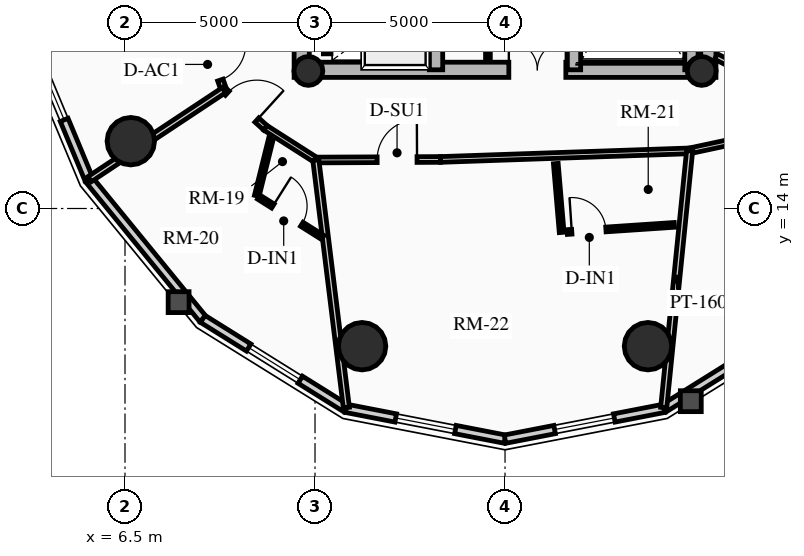
"""IFC4 building model, lengths in metres.
Left out: names, types, materials, properties, quantities, classifications, styles, units other than length and angle.
Written with IfcOpenShell. Run it as: python <this file> out.ifc"""

import sys

from ifc_helpers import new_model, si_unit, direction, frame, frame_2d, origin, origin_2d, place, context, subcontext, project, spatial, rectangle, circle, hollow_circle, extrude, source, transform, mapped, element, fill, save


model = new_model("IFC4")
c1 = context("Model", 3, precision=1e-05, world=origin(), true_north=direction((0.0, 1.0)))
c2 = subcontext(c1, "Body", "Model", "MODEL_VIEW")
j1 = project(units=[si_unit("LENGTHUNIT", "METRE"), si_unit("PLANEANGLEUNIT", "RADIAN")], contexts=[c1])
p1 = place(None, origin())
s1 = spatial("IfcSite", under=j1, at=p1, CompositionType="ELEMENT")
p2 = place(p1, origin())
s2 = spatial("IfcBuilding", under=s1, at=p2, CompositionType="ELEMENT")
p3 = place(p2, frame((0.0, 0.0, 183.61)))
s3 = spatial("IfcBuildingStorey", under=s2, at=p3, CompositionType="ELEMENT", Elevation=183.61)
for number, where, z_axis, x_axis in (
    (1, (11.15, 17.45, 0.0), (0.0, 0.0, 1.0), (0.0, 1.0, 0.0)),
    (2, (21.85, 17.45, 0.0), (0.0, 0.0, 1.0), (0.0, 1.0, 0.0)),
):
    element("IfcWall", number, at=place(p3, frame(where, z_axis=z_axis, x_axis=x_axis)), inside=s3, PredefinedType="SHEAR", context=c2, shape_type="SweptSolid", body=[
        extrude(rectangle(XDim=14.1, YDim=0.4, at=frame_2d((7.05, 0.0))), origin(), (0.0, 0.0, 1.0), 2.91),
    ])
p4 = place(p3, frame((11.15, 17.65, 0.0), z_axis=(0.0, 0.0, 1.0), x_axis=(1.0, 0.0, 0.0)))
e3 = element("IfcWall", 3, at=p4, inside=s3, PredefinedType="SHEAR", context=c2, shape_type="SweptSolid", body=[
    extrude(rectangle(XDim=10.7, YDim=0.4, at=frame_2d((5.35, 0.0))), origin(), (0.0, 0.0, 1.0), 2.91),
])
m1 = source(origin(), c2, "Body", "SweptSolid", [
    extrude(rectangle(XDim=1.5, YDim=2.02, at=frame_2d((0.75, 1.01))), frame((0.0, 0.21, 0.0), z_axis=(0.0, -1.0, 0.0), x_axis=(1.0, 0.0, 0.0)), (0.0, 0.0, 1.0), 0.42),
])
p5 = place(p4, frame((5.45, 0.0, 0.0)))
e4 = element("IfcOpeningElement", 4, at=p5, cuts=e3, PredefinedType="OPENING", context=c2, shape_type="MappedRepresentation", body=[
    mapped(m1, transform((0.0, 0.0, 0.0), x_axis=(1.0, 0.0, 0.0), y_axis=(0.0, 1.0, 0.0), z_axis=(0.0, 0.0, 1.0), scale=1.0)),
])
p6 = place(p3, frame((14.685, 17.65, 0.0), z_axis=(0.0, 0.0, 1.0), x_axis=(0.0, 1.0, 0.0)))
e5 = element("IfcWall", 5, at=p6, inside=s3, PredefinedType="SHEAR", context=c2, shape_type="SweptSolid", body=[
    extrude(rectangle(XDim=13.7, YDim=0.35, at=frame_2d((6.85, 0.0))), origin(), (0.0, 0.0, 1.0), 2.91),
])
m2 = source(origin(), c2, "Body", "SweptSolid", [
    extrude(rectangle(XDim=1.1, YDim=2.015, at=frame_2d((0.55, 1.007))), frame((0.0, 0.185, 0.0), z_axis=(0.0, -1.0, 0.0), x_axis=(1.0, 0.0, 0.0)), (0.0, 0.0, 1.0), 0.37),
])
p7 = place(p6, frame((4.85, 0.0, 0.0)))
e6 = element("IfcOpeningElement", 6, at=p7, cuts=e5, PredefinedType="OPENING", context=c2, shape_type="MappedRepresentation", body=[
    mapped(m2, transform((0.0, 0.0, 0.0), x_axis=(1.0, 0.0, 0.0), y_axis=(0.0, 1.0, 0.0), z_axis=(0.0, 0.0, 1.0), scale=1.0)),
])
p8 = place(p6, frame((0.625, 0.0, 0.0)))
e7 = element("IfcOpeningElement", 7, at=p8, cuts=e5, PredefinedType="OPENING", context=c2, shape_type="MappedRepresentation", body=[
    mapped(m2, transform((0.0, 0.0, 0.0), x_axis=(1.0, 0.0, 0.0), y_axis=(0.0, 1.0, 0.0), z_axis=(0.0, 0.0, 1.0), scale=1.0)),
])
p9 = place(p6, frame((2.625, 0.0, 0.0)))
e8 = element("IfcOpeningElement", 8, at=p9, cuts=e5, PredefinedType="OPENING", context=c2, shape_type="MappedRepresentation", body=[
    mapped(m2, transform((0.0, 0.0, 0.0), x_axis=(1.0, 0.0, 0.0), y_axis=(0.0, 1.0, 0.0), z_axis=(0.0, 0.0, 1.0), scale=1.0)),
])
m3 = source(origin(), c2, "Body", "SweptSolid", [
    extrude(rectangle(XDim=1.15, YDim=2.02, at=frame_2d((0.575, 1.01))), frame((0.0, 0.185, 0.0), z_axis=(0.0, -1.0, 0.0), x_axis=(1.0, 0.0, 0.0)), (0.0, 0.0, 1.0), 0.37),
])
p10 = place(p6, frame((7.27, 0.0, 0.0)))
e9 = element("IfcOpeningElement", 9, at=p10, cuts=e5, PredefinedType="OPENING", context=c2, shape_type="MappedRepresentation", body=[
    mapped(m3, transform((0.0, 0.0, 0.0), x_axis=(1.0, 0.0, 0.0), y_axis=(0.0, 1.0, 0.0), z_axis=(0.0, 0.0, 1.0), scale=1.0)),
])
p11 = place(p3, frame((18.315, 17.65, 0.0), z_axis=(0.0, 0.0, 1.0), x_axis=(0.0, 1.0, 0.0)))
e10 = element("IfcWall", 10, at=p11, inside=s3, PredefinedType="SHEAR", context=c2, shape_type="SweptSolid", body=[
    extrude(rectangle(XDim=9.6, YDim=0.35, at=frame_2d((4.8, 0.0))), origin(), (0.0, 0.0, 1.0), 2.91),
])
p12 = place(p11, frame((5.28, 0.0, 0.0)))
e11 = element("IfcOpeningElement", 11, at=p12, cuts=e10, PredefinedType="OPENING", context=c2, shape_type="MappedRepresentation", body=[
    mapped(m3, transform((0.0, 0.0, 0.0), x_axis=(1.0, 0.0, 0.0), y_axis=(0.0, 1.0, 0.0), z_axis=(0.0, 0.0, 1.0), scale=1.0)),
])
p13 = place(p3, frame((21.405, 17.65, 0.0), z_axis=(0.0, 0.0, 1.0), x_axis=(0.0, 1.0, 0.0)))
e12 = element("IfcWall", 12, at=p13, inside=s3, PredefinedType="SHEAR", context=c2, shape_type="SweptSolid", body=[
    extrude(rectangle(XDim=6.695, YDim=0.35, at=frame_2d((3.348, 0.0))), origin(), (0.0, 0.0, 1.0), 2.91),
])
for number, where, z_axis, x_axis in (
    (13, (11.325, 17.62, 0.0), (0.0, 0.0, 1.0), (1.0, 0.0, 0.0)),
    (14, (21.675, 17.62, 0.0), (0.0, 0.0, 1.0), (1.0, 0.0, 0.0)),
):
    element("IfcColumn", number, at=place(p3, frame(where, z_axis=z_axis, x_axis=x_axis)), inside=s3, PredefinedType="COLUMN", context=c2, shape_type="SweptSolid", body=[
        extrude(hollow_circle(Radius=0.38, WallThickness=0.032, at=origin_2d()), origin(), (0.0, 0.0, 1.0), 2.91),
    ])
for number, where, z_axis, x_axis in (
    (15, (6.653, 15.771, 0.0), (0.0, 0.0, 1.0), (1.0, 0.0, 0.0)),
    (16, (12.739, 10.377, 0.0), (0.0, 0.0, 1.0), (1.0, 0.0, 0.0)),
    (17, (20.261, 10.377, 0.0), (0.0, 0.0, 1.0), (1.0, 0.0, 0.0)),
):
    element("IfcColumn", number, at=place(p3, frame(where, z_axis=z_axis, x_axis=x_axis)), inside=s3, PredefinedType="USERDEFINED", context=c2, shape_type="SweptSolid", body=[
        extrude(circle(Radius=0.625, at=origin_2d()), origin(), (0.0, 0.0, 1.0), 2.91),
    ])
p14 = place(p3, frame((5.553, 14.76, 0.0), z_axis=(0.0, 0.0, 1.0), x_axis=(-0.384144094086, 0.923273152961, 0.0)))
e18 = element("IfcWall", 18, at=p14, inside=s3, PredefinedType="SOLIDWALL", context=c2, shape_type="SweptSolid", body=[
    extrude(rectangle(XDim=5.003, YDim=0.22, at=frame_2d((2.501, 0.0))), origin(), (0.0, 0.0, 1.0), 2.245),
])
m4 = source(origin(), c2, "Body", "SweptSolid", [
    extrude(rectangle(XDim=1.6, YDim=1.3, at=frame_2d((0.8, 0.65))), frame((0.0, 0.12, 0.0), z_axis=(0.0, -1.0, 0.0), x_axis=(1.0, 0.0, 0.0)), (0.0, 0.0, 1.0), 0.24),
])
p15 = place(p14, frame((1.702, 0.0, 0.65)))
e19 = element("IfcOpeningElement", 19, at=p15, cuts=e18, PredefinedType="OPENING", context=c2, shape_type="MappedRepresentation", body=[
    mapped(m4, transform((0.0, 0.0, 0.0), x_axis=(1.0, 0.0, 0.0), y_axis=(0.0, 1.0, 0.0), z_axis=(0.0, 0.0, 1.0), scale=1.0)),
])
p16 = place(p3, frame((8.547, 11.094, 0.0), z_axis=(0.0, 0.0, 1.0), x_axis=(-0.632470615287, 0.774584353572, 0.0)))
e20 = element("IfcWall", 20, at=p16, inside=s3, PredefinedType="SOLIDWALL", context=c2, shape_type="SweptSolid", body=[
    extrude(rectangle(XDim=4.733, YDim=0.22, at=frame_2d((2.366, 0.0))), origin(), (0.0, 0.0, 1.0), 2.245),
])
p17 = place(p3, frame((12.319, 8.741, 0.0), z_axis=(0.0, 0.0, 1.0), x_axis=(-0.848399108042, 0.529357113368, 0.0)))
e21 = element("IfcWall", 21, at=p17, inside=s3, PredefinedType="SOLIDWALL", context=c2, shape_type="SweptSolid", body=[
    extrude(rectangle(XDim=4.446, YDim=0.22, at=frame_2d((2.223, 0.0))), origin(), (0.0, 0.0, 1.0), 2.245),
])
p18 = place(p17, frame((1.423, 0.0, 0.65)))
e22 = element("IfcOpeningElement", 22, at=p18, cuts=e21, PredefinedType="OPENING", context=c2, shape_type="MappedRepresentation", body=[
    mapped(m4, transform((0.0, 0.0, 0.0), x_axis=(1.0, 0.0, 0.0), y_axis=(0.0, 1.0, 0.0), z_axis=(0.0, 0.0, 1.0), scale=1.0)),
])
p19 = place(p3, frame((16.5, 7.93, 0.0), z_axis=(0.0, 0.0, 1.0), x_axis=(-0.981703883443, 0.190413983815, 0.0)))
e23 = element("IfcWall", 23, at=p19, inside=s3, PredefinedType="SOLIDWALL", context=c2, shape_type="SweptSolid", body=[
    extrude(rectangle(XDim=4.259, YDim=0.22, at=frame_2d((2.13, 0.0))), origin(), (0.0, 0.0, 1.0), 2.245),
])
p20 = place(p19, frame((1.33, 0.0, 0.65)))
e24 = element("IfcOpeningElement", 24, at=p20, cuts=e23, PredefinedType="OPENING", context=c2, shape_type="MappedRepresentation", body=[
    mapped(m4, transform((0.0, 0.0, 0.0), x_axis=(1.0, 0.0, 0.0), y_axis=(0.0, 1.0, 0.0), z_axis=(0.0, 0.0, 1.0), scale=1.0)),
])
p21 = place(p3, frame((20.681, 8.741, 0.0), z_axis=(0.0, 0.0, 1.0), x_axis=(-0.981703883443, -0.190413983815, 0.0)))
e25 = element("IfcWall", 25, at=p21, inside=s3, PredefinedType="SOLIDWALL", context=c2, shape_type="SweptSolid", body=[
    extrude(rectangle(XDim=4.259, YDim=0.22, at=frame_2d((2.13, 0.0))), origin(), (0.0, 0.0, 1.0), 2.245),
])
p22 = place(p21, frame((1.33, 0.0, 0.65)))
e26 = element("IfcOpeningElement", 26, at=p22, cuts=e25, PredefinedType="OPENING", context=c2, shape_type="MappedRepresentation", body=[
    mapped(m4, transform((0.0, 0.0, 0.0), x_axis=(1.0, 0.0, 0.0), y_axis=(0.0, 1.0, 0.0), z_axis=(0.0, 0.0, 1.0), scale=1.0)),
])
p23 = place(p3, frame((24.453, 11.094, 0.0), z_axis=(0.0, 0.0, 1.0), x_axis=(-0.848399108042, -0.529357113368, 0.0)))
e27 = element("IfcWall", 27, at=p23, inside=s3, PredefinedType="SOLIDWALL", context=c2, shape_type="SweptSolid", body=[
    extrude(rectangle(XDim=4.446, YDim=0.22, at=frame_2d((2.223, 0.0))), origin(), (0.0, 0.0, 1.0), 2.245),
])
p24 = place(p3, frame((11.82, 18.07, 0.0), z_axis=(0.0, 0.0, 1.0), x_axis=(0.0, 1.0, 0.0)))
e28 = element("IfcWall", 28, at=p24, inside=s3, PredefinedType="SHEAR", context=c2, shape_type="SweptSolid", body=[
    extrude(rectangle(XDim=1.635, YDim=0.2, at=frame_2d((0.817, 0.0))), origin(), (0.0, 0.0, 1.0), 2.91),
])
p25 = place(p3, frame((16.05, 17.92, 0.0), z_axis=(0.0, 0.0, 1.0), x_axis=(0.0, 1.0, 0.0)))
e29 = element("IfcWall", 29, at=p25, inside=s3, PredefinedType="PARTITIONING", context=c2, shape_type="SweptSolid", body=[
    extrude(rectangle(XDim=3.08, YDim=0.125, at=frame_2d((1.54, 0.0))), origin(), (0.0, 0.0, 1.0), 2.675),
])
m5 = source(origin(), c2, "Body", "SweptSolid", [
    extrude(rectangle(XDim=0.9, YDim=2.005, at=frame_2d((0.45, 1.002))), frame((0.0, 0.073, 0.0), z_axis=(0.0, -1.0, 0.0), x_axis=(1.0, 0.0, 0.0)), (0.0, 0.0, 1.0), 0.145),
])
p26 = place(p25, frame((1.05, 0.0, 0.0)))
e30 = element("IfcOpeningElement", 30, at=p26, cuts=e29, PredefinedType="OPENING", context=c2, shape_type="MappedRepresentation", body=[
    mapped(m5, transform((0.0, 0.0, 0.0), x_axis=(1.0, 0.0, 0.0), y_axis=(0.0, 1.0, 0.0), z_axis=(0.0, 0.0, 1.0), scale=1.0)),
])
p27 = place(p3, frame((8.636, 18.436, 0.0), z_axis=(0.0, 0.0, 1.0), x_axis=(0.333211866524, -0.942851977782, 0.0)))
e31 = element("IfcWall", 31, at=p27, inside=s3, PredefinedType="PARTITIONING", context=c2, shape_type="SweptSolid", body=[
    extrude(rectangle(XDim=1.402, YDim=0.15, at=frame_2d((0.701, 0.0))), origin(), (0.0, 0.0, 1.0), 2.245),
])
m6 = source(origin(), c2, "Body", "SweptSolid", [
    extrude(rectangle(XDim=1.0, YDim=2.015, at=frame_2d((0.5, 1.007))), frame((0.0, 0.085, 0.0), z_axis=(0.0, -1.0, 0.0), x_axis=(1.0, 0.0, 0.0)), (0.0, 0.0, 1.0), 0.17),
])
p28 = place(p27, frame((0.12, 0.0, 0.0)))
e32 = element("IfcOpeningElement", 32, at=p28, cuts=e31, PredefinedType="OPENING", context=c2, shape_type="MappedRepresentation", body=[
    mapped(m6, transform((0.0, 0.0, 0.0), x_axis=(1.0, 0.0, 0.0), y_axis=(0.0, 1.0, 0.0), z_axis=(0.0, 0.0, 1.0), scale=1.0)),
])
p29 = place(p3, frame((9.103, 17.115, 0.0), z_axis=(0.0, 0.0, 1.0), x_axis=(0.740186897911, -0.672401186912, 0.0)))
e33 = element("IfcWall", 33, at=p29, inside=s3, PredefinedType="PARTITIONING", context=c2, shape_type="SweptSolid", body=[
    extrude(rectangle(XDim=1.477, YDim=0.15, at=frame_2d((0.738, 0.0))), origin(), (0.0, 0.0, 1.0), 2.245),
])
m7 = source(origin(), c2, "Body", "SweptSolid", [
    extrude(rectangle(XDim=1.05, YDim=2.015, at=frame_2d((0.525, 1.007))), frame((0.0, 0.085, 0.0), z_axis=(0.0, -1.0, 0.0), x_axis=(1.0, 0.0, 0.0)), (0.0, 0.0, 1.0), 0.17),
])
p30 = place(p29, frame((0.12, 0.0, 0.0)))
e34 = element("IfcOpeningElement", 34, at=p30, cuts=e33, PredefinedType="OPENING", context=c2, shape_type="MappedRepresentation", body=[
    mapped(m7, transform((0.0, 0.0, 0.0), x_axis=(1.0, 0.0, 0.0), y_axis=(0.0, 1.0, 0.0), z_axis=(0.0, 0.0, 1.0), scale=1.0)),
])
p31 = place(p3, frame((10.196, 16.122, 0.0), z_axis=(0.0, 0.0, 1.0), x_axis=(0.843021142441, -0.537880426673, 0.0)))
e35 = element("IfcWall", 35, at=p31, inside=s3, PredefinedType="PARTITIONING", context=c2, shape_type="SweptSolid", body=[
    extrude(rectangle(XDim=1.571, YDim=0.15, at=frame_2d((0.786, 0.0))), origin(), (0.0, 0.0, 1.0), 2.245),
])
p32 = place(p3, frame((11.521, 15.276, 0.0), z_axis=(0.0, 0.0, 1.0), x_axis=(0.999990688463, 0.004315436007, 0.0)))
e36 = element("IfcWall", 36, at=p32, inside=s3, PredefinedType="PARTITIONING", context=c2, shape_type="SweptSolid", body=[
    extrude(rectangle(XDim=3.281, YDim=0.15, at=frame_2d((1.641, 0.0))), origin(), (0.0, 0.0, 1.0), 2.245),
])
p33 = place(p32, frame((1.613, 0.0, 0.0)))
e37 = element("IfcOpeningElement", 37, at=p33, cuts=e36, PredefinedType="OPENING", context=c2, shape_type="MappedRepresentation", body=[
    mapped(m7, transform((0.0, 0.0, 0.0), x_axis=(1.0, 0.0, 0.0), y_axis=(0.0, 1.0, 0.0), z_axis=(0.0, 0.0, 1.0), scale=1.0)),
])
p34 = place(p3, frame((14.802, 15.291, 0.0), z_axis=(0.0, 0.0, 1.0), x_axis=(0.999405778293, 0.034468686011, 0.0)))
e38 = element("IfcWall", 38, at=p34, inside=s3, PredefinedType="PARTITIONING", context=c2, shape_type="SweptSolid", body=[
    extrude(rectangle(XDim=6.559, YDim=0.15, at=frame_2d((3.279, 0.0))), origin(), (0.0, 0.0, 1.0), 2.245),
])
p35 = place(p3, frame((21.357, 15.517, 0.0), z_axis=(0.0, 0.0, 1.0), x_axis=(0.977773676035, 0.209663154733, 0.0)))
e39 = element("IfcWall", 39, at=p35, inside=s3, PredefinedType="PARTITIONING", context=c2, shape_type="SweptSolid", body=[
    extrude(rectangle(XDim=1.865, YDim=0.15, at=frame_2d((0.933, 0.0))), origin(), (0.0, 0.0, 1.0), 2.245),
])
p36 = place(p3, frame((9.103, 17.115, 0.0), z_axis=(0.0, 0.0, 1.0), x_axis=(-0.833535637115, -0.552465692745, 0.0)))
e40 = element("IfcWall", 40, at=p36, inside=s3, PredefinedType="PARTITIONING", context=c2, shape_type="SweptSolid", body=[
    extrude(rectangle(XDim=4.24, YDim=0.16, at=frame_2d((2.12, 0.0))), origin(), (0.0, 0.0, 1.0), 2.245),
])
p37 = place(p3, frame((11.521, 15.276, 0.0), z_axis=(0.0, 0.0, 1.0), x_axis=(0.122446537769, -0.992475110715, 0.0)))
e41 = element("IfcWall", 41, at=p37, inside=s3, PredefinedType="PARTITIONING", context=c2, shape_type="SweptSolid", body=[
    extrude(rectangle(XDim=6.566, YDim=0.16, at=frame_2d((3.283, 0.0))), origin(), (0.0, 0.0, 1.0), 2.245),
])
p38 = place(p3, frame((21.357, 15.517, 0.0), z_axis=(0.0, 0.0, 1.0), x_axis=(-0.100446941693, -0.994942416376, 0.0)))
e42 = element("IfcWall", 42, at=p38, inside=s3, PredefinedType="PARTITIONING", context=c2, shape_type="SweptSolid", body=[
    extrude(rectangle(XDim=6.791, YDim=0.16, at=frame_2d((3.396, 0.0))), origin(), (0.0, 0.0, 1.0), 2.245),
])
p39 = place(p3, frame((22.05, 18.0, 0.0), z_axis=(0.0, 0.0, 1.0), x_axis=(0.890660222535, -0.454669515136, 0.0)))
e43 = element("IfcWall", 43, at=p39, inside=s3, PredefinedType="PARTITIONING", context=c2, shape_type="SweptSolid", body=[
    extrude(rectangle(XDim=2.144, YDim=0.16, at=frame_2d((1.072, 0.0))), origin(), (0.0, 0.0, 1.0), 2.245),
])
m8 = source(origin(), c2, "Body", "SweptSolid", [
    extrude(rectangle(XDim=1.05, YDim=2.015, at=frame_2d((0.525, 1.007))), frame((0.0, 0.09, 0.0), z_axis=(0.0, -1.0, 0.0), x_axis=(1.0, 0.0, 0.0)), (0.0, 0.0, 1.0), 0.18),
])
p40 = place(p39, frame((0.894, 0.0, 0.0)))
e44 = element("IfcOpeningElement", 44, at=p40, cuts=e43, PredefinedType="OPENING", context=c2, shape_type="MappedRepresentation", body=[
    mapped(m8, transform((0.0, 0.0, 0.0), x_axis=(1.0, 0.0, 0.0), y_axis=(0.0, 1.0, 0.0), z_axis=(0.0, 0.0, 1.0), scale=1.0)),
])
p41 = place(p3, frame((10.343, 15.847, 0.0), z_axis=(0.0, 0.0, 1.0), x_axis=(-0.240988864291, -0.970527880737, 0.0)))
e45 = element("IfcWall", 45, at=p41, inside=s3, PredefinedType="PARTITIONING", context=c2, shape_type="SweptSolid", body=[
    extrude(rectangle(XDim=1.56, YDim=0.125, at=frame_2d((0.78, 0.0))), origin(), (0.0, 0.0, 1.0), 2.245),
])
p42 = place(p3, frame((10.02, 14.299, 0.0), z_axis=(0.0, 0.0, 1.0), x_axis=(0.846015763056, -0.533157883427, 0.0)))
e46 = element("IfcWall", 46, at=p42, inside=s3, PredefinedType="PARTITIONING", context=c2, shape_type="SweptSolid", body=[
    extrude(rectangle(XDim=1.991, YDim=0.125, at=frame_2d((0.996, 0.0))), origin(), (0.0, 0.0, 1.0), 2.675),
])
p43 = place(p42, frame((0.439, 0.0, 0.0)))
e47 = element("IfcOpeningElement", 47, at=p43, cuts=e46, PredefinedType="OPENING", context=c2, shape_type="MappedRepresentation", body=[
    mapped(m5, transform((0.0, 0.0, 0.0), x_axis=(1.0, 0.0, 0.0), y_axis=(0.0, 1.0, 0.0), z_axis=(0.0, 0.0, 1.0), scale=1.0)),
])
p44 = place(p3, frame((17.836, 15.182, 0.0), z_axis=(0.0, 0.0, 1.0), x_axis=(0.084856554172, -0.996393178025, 0.0)))
e48 = element("IfcWall", 48, at=p44, inside=s3, PredefinedType="PARTITIONING", context=c2, shape_type="SweptSolid", body=[
    extrude(rectangle(XDim=1.818, YDim=0.125, at=frame_2d((0.909, 0.0))), origin(), (0.0, 0.0, 1.0), 2.675),
])
p45 = place(p3, frame((18.137, 13.38, 0.0), z_axis=(0.0, 0.0, 1.0), x_axis=(0.997767152953, 0.066788535611, 0.0)))
e49 = element("IfcWall", 49, at=p45, inside=s3, PredefinedType="PARTITIONING", context=c2, shape_type="SweptSolid", body=[
    extrude(rectangle(XDim=2.826, YDim=0.125, at=frame_2d((1.413, 0.0))), origin(), (0.0, 0.0, 1.0), 2.245),
])
p46 = place(p45, frame((0.12, 0.0, 0.0)))
e50 = element("IfcOpeningElement", 50, at=p46, cuts=e49, PredefinedType="OPENING", context=c2, shape_type="MappedRepresentation", body=[
    mapped(m5, transform((0.0, 0.0, 0.0), x_axis=(1.0, 0.0, 0.0), y_axis=(0.0, 1.0, 0.0), z_axis=(0.0, 0.0, 1.0), scale=1.0)),
])
m9 = source(origin(), c2, "Body", "SweptSolid", [
    extrude(rectangle(XDim=1.6, YDim=1.3, at=frame_2d((0.8, 0.65))), frame((0.0, 0.03, 0.0), z_axis=(0.0, -1.0, 0.0), x_axis=(1.0, 0.0, 0.0)), (0.0, 0.0, 1.0), 0.06),
])
p47 = place(p15, origin())
e51 = element("IfcWindow", 51, at=p47, inside=s3, PartitioningType="SINGLE_PANEL", PredefinedType="WINDOW", context=c2, shape_type="MappedRepresentation", body=[
    mapped(m9, transform((0.0, 0.0, 0.0), x_axis=(1.0, 0.0, 0.0), y_axis=(0.0, 1.0, 0.0), z_axis=(0.0, 0.0, 1.0), scale=1.0)),
])
fill(e19, e51)
p48 = place(p18, origin())
e52 = element("IfcWindow", 52, at=p48, inside=s3, PartitioningType="SINGLE_PANEL", PredefinedType="WINDOW", context=c2, shape_type="MappedRepresentation", body=[
    mapped(m9, transform((0.0, 0.0, 0.0), x_axis=(1.0, 0.0, 0.0), y_axis=(0.0, 1.0, 0.0), z_axis=(0.0, 0.0, 1.0), scale=1.0)),
])
fill(e22, e52)
p49 = place(p20, origin())
e53 = element("IfcWindow", 53, at=p49, inside=s3, PartitioningType="SINGLE_PANEL", PredefinedType="WINDOW", context=c2, shape_type="MappedRepresentation", body=[
    mapped(m9, transform((0.0, 0.0, 0.0), x_axis=(1.0, 0.0, 0.0), y_axis=(0.0, 1.0, 0.0), z_axis=(0.0, 0.0, 1.0), scale=1.0)),
])
fill(e24, e53)
p50 = place(p22, origin())
e54 = element("IfcWindow", 54, at=p50, inside=s3, PartitioningType="SINGLE_PANEL", PredefinedType="WINDOW", context=c2, shape_type="MappedRepresentation", body=[
    mapped(m9, transform((0.0, 0.0, 0.0), x_axis=(1.0, 0.0, 0.0), y_axis=(0.0, 1.0, 0.0), z_axis=(0.0, 0.0, 1.0), scale=1.0)),
])
fill(e26, e54)
m10 = source(origin(), c2, "Body", "SweptSolid", [
    extrude(rectangle(XDim=1.5, YDim=2.02, at=frame_2d((0.75, 1.01))), frame((0.0, 0.025, 0.0), z_axis=(0.0, -1.0, 0.0), x_axis=(1.0, 0.0, 0.0)), (0.0, 0.0, 1.0), 0.05),
])
p51 = place(p5, origin())
e55 = element("IfcDoor", 55, at=p51, inside=s3, OperationType="DOUBLE_DOOR_SINGLE_SWING", PredefinedType="DOOR", context=c2, shape_type="MappedRepresentation", body=[
    mapped(m10, transform((0.0, 0.0, 0.0), x_axis=(1.0, 0.0, 0.0), y_axis=(0.0, 1.0, 0.0), z_axis=(0.0, 0.0, 1.0), scale=1.0)),
])
fill(e4, e55)
m11 = source(origin(), c2, "Body", "SweptSolid", [
    extrude(rectangle(XDim=1.0, YDim=2.015, at=frame_2d((0.5, 1.007))), frame((0.0, 0.025, 0.0), z_axis=(0.0, -1.0, 0.0), x_axis=(1.0, 0.0, 0.0)), (0.0, 0.0, 1.0), 0.05),
])
p52 = place(p28, origin())
e56 = element("IfcDoor", 56, at=p52, inside=s3, OperationType="SINGLE_SWING_LEFT", PredefinedType="DOOR", context=c2, shape_type="MappedRepresentation", body=[
    mapped(m11, transform((0.0, 0.0, 0.0), x_axis=(1.0, 0.0, 0.0), y_axis=(0.0, 1.0, 0.0), z_axis=(0.0, 0.0, 1.0), scale=1.0)),
])
fill(e32, e56)
m12 = source(origin(), c2, "Body", "SweptSolid", [
    extrude(rectangle(XDim=1.05, YDim=2.015, at=frame_2d((0.525, 1.007))), frame((0.0, 0.025, 0.0), z_axis=(0.0, -1.0, 0.0), x_axis=(1.0, 0.0, 0.0)), (0.0, 0.0, 1.0), 0.05),
])
p53 = place(p30, origin())
e57 = element("IfcDoor", 57, at=p53, inside=s3, OperationType="SINGLE_SWING_RIGHT", PredefinedType="DOOR", context=c2, shape_type="MappedRepresentation", body=[
    mapped(m12, transform((0.0, 0.0, 0.0), x_axis=(1.0, 0.0, 0.0), y_axis=(0.0, 1.0, 0.0), z_axis=(0.0, 0.0, 1.0), scale=1.0)),
])
fill(e34, e57)
m13 = source(origin(), c2, "Body", "SweptSolid", [
    extrude(rectangle(XDim=0.9, YDim=2.005, at=frame_2d((0.45, 1.002))), frame((0.0, 0.025, 0.0), z_axis=(0.0, -1.0, 0.0), x_axis=(1.0, 0.0, 0.0)), (0.0, 0.0, 1.0), 0.05),
])
p54 = place(p43, origin())
e58 = element("IfcDoor", 58, at=p54, inside=s3, OperationType="SINGLE_SWING_LEFT", PredefinedType="DOOR", context=c2, shape_type="MappedRepresentation", body=[
    mapped(m13, transform((0.0, 0.0, 0.0), x_axis=(1.0, 0.0, 0.0), y_axis=(0.0, 1.0, 0.0), z_axis=(0.0, 0.0, 1.0), scale=1.0)),
])
fill(e47, e58)
p55 = place(p33, origin())
e59 = element("IfcDoor", 59, at=p55, inside=s3, OperationType="SINGLE_SWING_RIGHT", PredefinedType="DOOR", context=c2, shape_type="MappedRepresentation", body=[
    mapped(m12, transform((0.0, 0.0, 0.0), x_axis=(1.0, 0.0, 0.0), y_axis=(0.0, 1.0, 0.0), z_axis=(0.0, 0.0, 1.0), scale=1.0)),
])
fill(e37, e59)
p56 = place(p46, origin())
e60 = element("IfcDoor", 60, at=p56, inside=s3, OperationType="SINGLE_SWING_LEFT", PredefinedType="DOOR", context=c2, shape_type="MappedRepresentation", body=[
    mapped(m13, transform((0.0, 0.0, 0.0), x_axis=(1.0, 0.0, 0.0), y_axis=(0.0, 1.0, 0.0), z_axis=(0.0, 0.0, 1.0), scale=1.0)),
])
fill(e50, e60)
save(model, sys.argv[1])
